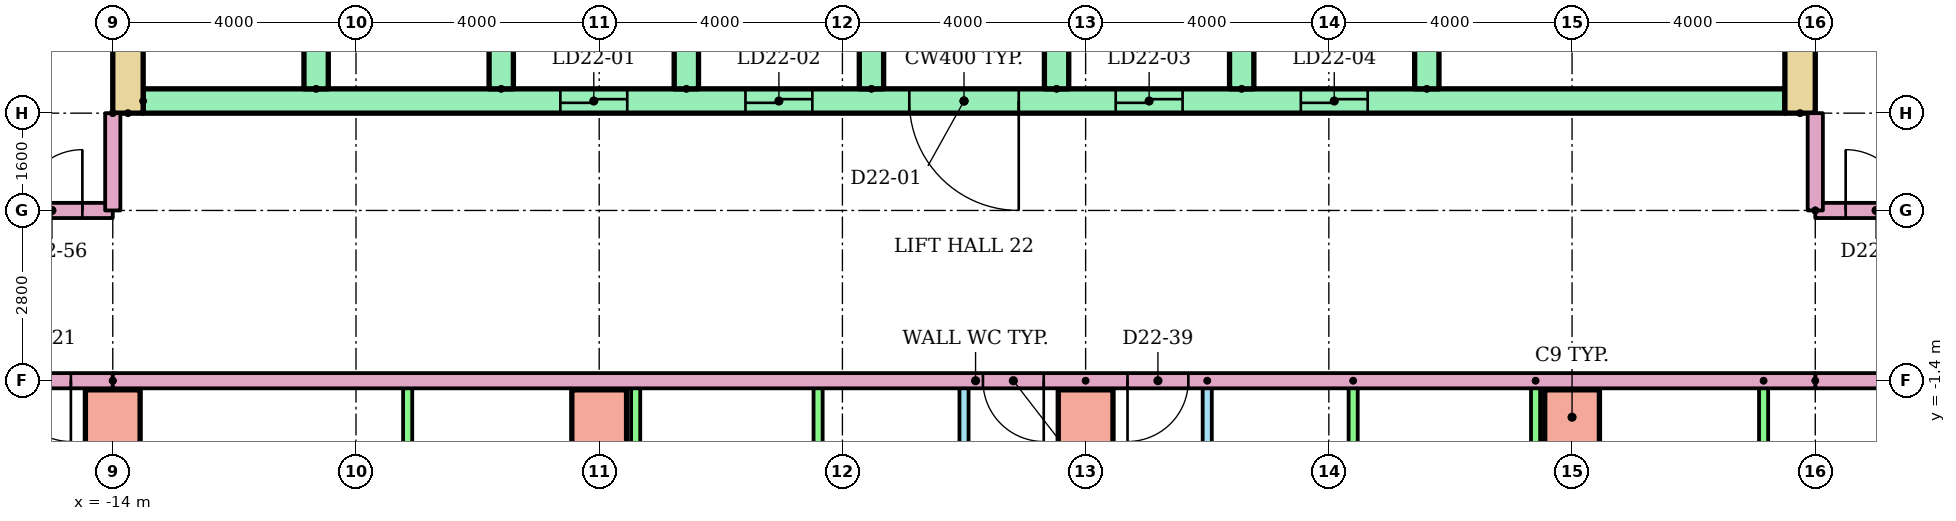
"""IFC4 building model, lengths in metres.
Left out: names, types, materials, properties, quantities, classifications, styles, units other than length and angle.
Written with IfcOpenShell. Run it as: python <this file> out.ifc"""

import sys

from ifc_helpers import new_model, si_unit, direction, frame, frame_2d, origin, origin_2d, place, context, subcontext, project, spatial, rectangle, extrude, element, fill, save


model = new_model("IFC4")
c1 = context("Model", 3, precision=1e-05, world=origin(), true_north=direction((0.0, 1.0)))
c2 = subcontext(c1, "Body", "Model", "MODEL_VIEW")
j1 = project(units=[si_unit("LENGTHUNIT", "METRE"), si_unit("PLANEANGLEUNIT", "RADIAN")], contexts=[c1])
p1 = place(None, origin())
s1 = spatial("IfcSite", under=j1, at=p1, CompositionType="ELEMENT")
p2 = place(p1, origin())
s2 = spatial("IfcBuilding", under=s1, at=p2, CompositionType="ELEMENT")
p3 = place(p2, frame((0.0, 0.0, 87.1)))
s3 = spatial("IfcBuildingStorey", under=s2, at=p3, CompositionType="ELEMENT", Elevation=87.1)
for number, where in (
    (1, (-14.0, -2.0, 0.0)),
    (2, (-6.0, -2.0, 0.0)),
    (3, (2.0, -2.0, 0.0)),
    (4, (10.0, -2.0, 0.0)),
):
    element("IfcColumn", number, at=place(p3, frame(where)), inside=s3, PredefinedType="COLUMN", context=c2, shape_type="SweptSolid", body=[
        extrude(rectangle(XDim=0.9, YDim=0.9, at=origin_2d()), origin(), (0.0, 0.0, 1.0), 3.2),
    ])
for number, where, z_axis, x_axis in (
    (5, (-13.75, 3.0, 0.0), (0.0, 0.0, 1.0), (0.0, 1.0, 0.0)),
    (6, (13.75, 3.0, 0.0), (0.0, 0.0, 1.0), (0.0, 1.0, 0.0)),
):
    element("IfcWall", number, at=place(p3, frame(where, z_axis=z_axis, x_axis=x_axis)), inside=s3, PredefinedType="SHEAR", context=c2, shape_type="SweptSolid", body=[
        extrude(rectangle(XDim=17.0, YDim=0.5, at=frame_2d((8.5, 0.0))), origin(), (0.0, 0.0, 1.0), 2.92),
    ])
p4 = place(p3, frame((-13.5, 3.2, 0.0)))
e7 = element("IfcWall", 7, at=p4, inside=s3, PredefinedType="SHEAR", context=c2, shape_type="SweptSolid", body=[
    extrude(rectangle(XDim=27.0, YDim=0.4, at=frame_2d((13.5, 0.0))), origin(), (0.0, 0.0, 1.0), 2.92),
])
p5 = place(p4, frame((6.861, 0.0, 0.0)))
e8 = element("IfcOpeningElement", 8, at=p5, cuts=e7, PredefinedType="OPENING", context=c2, shape_type="SweptSolid", body=[
    extrude(rectangle(XDim=1.1, YDim=2.1, at=frame_2d((0.55, 1.05))), frame((0.0, 0.21, 0.0), z_axis=(0.0, -1.0, 0.0), x_axis=(1.0, 0.0, 0.0)), (0.0, 0.0, 1.0), 0.42),
])
p6 = place(p4, frame((9.906, 0.0, 0.0)))
e9 = element("IfcOpeningElement", 9, at=p6, cuts=e7, PredefinedType="OPENING", context=c2, shape_type="SweptSolid", body=[
    extrude(rectangle(XDim=1.1, YDim=2.1, at=frame_2d((0.55, 1.05))), frame((0.0, 0.21, 0.0), z_axis=(0.0, -1.0, 0.0), x_axis=(1.0, 0.0, 0.0)), (0.0, 0.0, 1.0), 0.42),
])
p7 = place(p4, frame((15.994, 0.0, 0.0)))
e10 = element("IfcOpeningElement", 10, at=p7, cuts=e7, PredefinedType="OPENING", context=c2, shape_type="SweptSolid", body=[
    extrude(rectangle(XDim=1.1, YDim=2.1, at=frame_2d((0.55, 1.05))), frame((0.0, 0.21, 0.0), z_axis=(0.0, -1.0, 0.0), x_axis=(1.0, 0.0, 0.0)), (0.0, 0.0, 1.0), 0.42),
])
p8 = place(p4, frame((19.039, 0.0, 0.0)))
e11 = element("IfcOpeningElement", 11, at=p8, cuts=e7, PredefinedType="OPENING", context=c2, shape_type="SweptSolid", body=[
    extrude(rectangle(XDim=1.1, YDim=2.1, at=frame_2d((0.55, 1.05))), frame((0.0, 0.21, 0.0), z_axis=(0.0, -1.0, 0.0), x_axis=(1.0, 0.0, 0.0)), (0.0, 0.0, 1.0), 0.42),
])
p9 = place(p4, frame((12.6, 0.0, 0.0)))
e12 = element("IfcOpeningElement", 12, at=p9, cuts=e7, PredefinedType="OPENING", context=c2, shape_type="SweptSolid", body=[
    extrude(rectangle(XDim=1.8, YDim=2.1, at=frame_2d((0.9, 1.05))), frame((0.0, 0.21, 0.0), z_axis=(0.0, -1.0, 0.0), x_axis=(1.0, 0.0, 0.0)), (0.0, 0.0, 1.0), 0.42),
])
for number, where, z_axis, x_axis in (
    (13, (-10.656, 3.4, 0.0), (0.0, 0.0, 1.0), (0.0, 1.0, 0.0)),
    (14, (-7.611, 3.4, 0.0), (0.0, 0.0, 1.0), (0.0, 1.0, 0.0)),
    (15, (-4.567, 3.4, 0.0), (0.0, 0.0, 1.0), (0.0, 1.0, 0.0)),
    (16, (-1.522, 3.4, 0.0), (0.0, 0.0, 1.0), (0.0, 1.0, 0.0)),
    (17, (1.522, 3.4, 0.0), (0.0, 0.0, 1.0), (0.0, 1.0, 0.0)),
    (18, (4.567, 3.4, 0.0), (0.0, 0.0, 1.0), (0.0, 1.0, 0.0)),
    (19, (7.611, 3.4, 0.0), (0.0, 0.0, 1.0), (0.0, 1.0, 0.0)),
):
    element("IfcWall", number, at=place(p3, frame(where, z_axis=z_axis, x_axis=x_axis)), inside=s3, PredefinedType="SHEAR", context=c2, shape_type="SweptSolid", body=[
        extrude(rectangle(XDim=3.0, YDim=0.4, at=frame_2d((1.5, 0.0))), origin(), (0.0, 0.0, 1.0), 2.92),
    ])
p10 = place(p3, frame((0.0, -9.1, 0.0), z_axis=(0.0, 0.0, 1.0), x_axis=(0.0, 1.0, 0.0)))
e20 = element("IfcWall", 20, at=p10, inside=s3, PredefinedType="PARTITIONING", context=c2, shape_type="SweptSolid", body=[
    extrude(rectangle(XDim=7.7, YDim=0.15, at=frame_2d((3.85, 0.0))), origin(), (0.0, 0.0, 1.0), 2.4),
])
p11 = place(p10, frame((5.125, 0.0, 0.0)))
e21 = element("IfcOpeningElement", 21, at=p11, cuts=e20, PredefinedType="OPENING", context=c2, shape_type="SweptSolid", body=[
    extrude(rectangle(XDim=0.9, YDim=2.1, at=frame_2d((0.45, 1.05))), frame((0.0, 0.085, 0.0), z_axis=(0.0, -1.0, 0.0), x_axis=(1.0, 0.0, 0.0)), (0.0, 0.0, 1.0), 0.17),
])
p12 = place(p10, frame((1.325, 0.0, 0.0)))
e22 = element("IfcOpeningElement", 22, at=p12, cuts=e20, PredefinedType="OPENING", context=c2, shape_type="SweptSolid", body=[
    extrude(rectangle(XDim=0.8, YDim=2.1, at=frame_2d((0.4, 1.05))), frame((0.0, 0.085, 0.0), z_axis=(0.0, -1.0, 0.0), x_axis=(1.0, 0.0, 0.0)), (0.0, 0.0, 1.0), 0.17),
])
for number, where, z_axis, x_axis in (
    (23, (-2.4, -9.1, 0.0), (0.0, 0.0, 1.0), (0.0, 1.0, 0.0)),
    (24, (-5.4, -9.1, 0.0), (0.0, 0.0, 1.0), (0.0, 1.0, 0.0)),
    (25, (-9.15, -9.1, 0.0), (0.0, 0.0, 1.0), (0.0, 1.0, 0.0)),
):
    element("IfcWall", number, at=place(p3, frame(where, z_axis=z_axis, x_axis=x_axis)), inside=s3, PredefinedType="PARTITIONING", context=c2, shape_type="SweptSolid", body=[
        extrude(rectangle(XDim=7.7, YDim=0.15, at=frame_2d((3.85, 0.0))), origin(), (0.0, 0.0, 1.0), 2.4),
    ])
p13 = place(p3, frame((-14.0, -1.4, 0.0), z_axis=(0.0, 0.0, 1.0), x_axis=(0.0, -1.0, 0.0)))
e26 = element("IfcWall", 26, at=p13, inside=s3, PredefinedType="PARTITIONING", context=c2, shape_type="SweptSolid", body=[
    extrude(rectangle(XDim=14.81, YDim=0.25, at=frame_2d((7.405, 0.0))), origin(), (0.0, 0.0, 1.0), 2.4),
])
p14 = place(p3, frame((4.0, -1.4, 0.0), z_axis=(0.0, 0.0, 1.0), x_axis=(0.0, -1.0, 0.0)))
e27 = element("IfcWall", 27, at=p14, inside=s3, PredefinedType="PARTITIONING", context=c2, shape_type="SweptSolid", body=[
    extrude(rectangle(XDim=7.7, YDim=0.15, at=frame_2d((3.85, 0.0))), origin(), (0.0, 0.0, 1.0), 2.4),
])
p15 = place(p14, frame((1.675, 0.0, 0.0)))
e28 = element("IfcOpeningElement", 28, at=p15, cuts=e27, PredefinedType="OPENING", context=c2, shape_type="SweptSolid", body=[
    extrude(rectangle(XDim=0.9, YDim=2.1, at=frame_2d((0.45, 1.05))), frame((0.0, 0.085, 0.0), z_axis=(0.0, -1.0, 0.0), x_axis=(1.0, 0.0, 0.0)), (0.0, 0.0, 1.0), 0.17),
])
p16 = place(p14, frame((5.575, 0.0, 0.0)))
e29 = element("IfcOpeningElement", 29, at=p16, cuts=e27, PredefinedType="OPENING", context=c2, shape_type="SweptSolid", body=[
    extrude(rectangle(XDim=0.8, YDim=2.1, at=frame_2d((0.4, 1.05))), frame((0.0, 0.085, 0.0), z_axis=(0.0, -1.0, 0.0), x_axis=(1.0, 0.0, 0.0)), (0.0, 0.0, 1.0), 0.17),
])
for number, where, z_axis, x_axis in (
    (30, (6.4, -1.4, 0.0), (0.0, 0.0, 1.0), (0.0, -1.0, 0.0)),
    (31, (9.4, -1.4, 0.0), (0.0, 0.0, 1.0), (0.0, -1.0, 0.0)),
    (32, (13.15, -1.4, 0.0), (0.0, 0.0, 1.0), (0.0, -1.0, 0.0)),
):
    element("IfcWall", number, at=place(p3, frame(where, z_axis=z_axis, x_axis=x_axis)), inside=s3, PredefinedType="PARTITIONING", context=c2, shape_type="SweptSolid", body=[
        extrude(rectangle(XDim=7.7, YDim=0.15, at=frame_2d((3.85, 0.0))), origin(), (0.0, 0.0, 1.0), 2.4),
    ])
p17 = place(p3, frame((2.0, -1.4, 0.0), z_axis=(0.0, 0.0, 1.0), x_axis=(0.0, -1.0, 0.0)))
e33 = element("IfcWall", 33, at=p17, inside=s3, PredefinedType="PARTITIONING", context=c2, shape_type="SweptSolid", body=[
    extrude(rectangle(XDim=14.81, YDim=0.25, at=frame_2d((7.405, 0.0))), origin(), (0.0, 0.0, 1.0), 2.4),
])
p18 = place(p3, frame((-14.0, -1.4, 0.0), z_axis=(0.0, 0.0, 1.0), x_axis=(-1.0, 0.0, 0.0)))
e34 = element("IfcWall", 34, at=p18, inside=s3, PredefinedType="PARTITIONING", context=c2, shape_type="SweptSolid", body=[
    extrude(rectangle(XDim=14.62, YDim=0.25, at=frame_2d((7.31, 0.0))), origin(), (0.0, 0.0, 1.0), 2.4),
])
p19 = place(p18, frame((0.689, 0.0, 0.0)))
e35 = element("IfcOpeningElement", 35, at=p19, cuts=e34, PredefinedType="OPENING", context=c2, shape_type="SweptSolid", body=[
    extrude(rectangle(XDim=1.0, YDim=2.1, at=frame_2d((0.5, 1.05))), frame((0.0, 0.135, 0.0), z_axis=(0.0, -1.0, 0.0), x_axis=(1.0, 0.0, 0.0)), (0.0, 0.0, 1.0), 0.27),
])
p20 = place(p3, frame((29.0, -1.4, 0.0), z_axis=(0.0, 0.0, 1.0), x_axis=(-1.0, 0.0, 0.0)))
e36 = element("IfcWall", 36, at=p20, inside=s3, PredefinedType="PARTITIONING", context=c2, shape_type="SweptSolid", body=[
    extrude(rectangle(XDim=15.0, YDim=0.25, at=frame_2d((7.5, 0.0))), origin(), (0.0, 0.0, 1.0), 2.4),
])
p21 = place(p20, frame((9.311, 0.0, 0.0)))
e37 = element("IfcOpeningElement", 37, at=p21, cuts=e36, PredefinedType="OPENING", context=c2, shape_type="SweptSolid", body=[
    extrude(rectangle(XDim=1.0, YDim=2.1, at=frame_2d((0.5, 1.05))), frame((0.0, 0.135, 0.0), z_axis=(0.0, -1.0, 0.0), x_axis=(1.0, 0.0, 0.0)), (0.0, 0.0, 1.0), 0.27),
])
p22 = place(p3, frame((-28.62, 1.4, 0.0)))
e38 = element("IfcWall", 38, at=p22, inside=s3, PredefinedType="PARTITIONING", context=c2, shape_type="SweptSolid", body=[
    extrude(rectangle(XDim=14.62, YDim=0.25, at=frame_2d((7.31, 0.0))), origin(), (0.0, 0.0, 1.0), 2.4),
])
p23 = place(p22, frame((13.12, 0.0, 0.0)))
e39 = element("IfcOpeningElement", 39, at=p23, cuts=e38, PredefinedType="OPENING", context=c2, shape_type="SweptSolid", body=[
    extrude(rectangle(XDim=1.0, YDim=2.1, at=frame_2d((0.5, 1.05))), frame((0.0, 0.135, 0.0), z_axis=(0.0, -1.0, 0.0), x_axis=(1.0, 0.0, 0.0)), (0.0, 0.0, 1.0), 0.27),
])
p24 = place(p3, frame((14.0, 1.4, 0.0)))
e40 = element("IfcWall", 40, at=p24, inside=s3, PredefinedType="PARTITIONING", context=c2, shape_type="SweptSolid", body=[
    extrude(rectangle(XDim=15.0, YDim=0.25, at=frame_2d((7.5, 0.0))), origin(), (0.0, 0.0, 1.0), 2.4),
])
p25 = place(p24, frame((0.5, 0.0, 0.0)))
e41 = element("IfcOpeningElement", 41, at=p25, cuts=e40, PredefinedType="OPENING", context=c2, shape_type="SweptSolid", body=[
    extrude(rectangle(XDim=1.0, YDim=2.1, at=frame_2d((0.5, 1.05))), frame((0.0, 0.135, 0.0), z_axis=(0.0, -1.0, 0.0), x_axis=(1.0, 0.0, 0.0)), (0.0, 0.0, 1.0), 0.27),
])
p26 = place(p24, frame((12.689, 0.0, 0.0)))
e42 = element("IfcOpeningElement", 42, at=p26, cuts=e40, PredefinedType="OPENING", context=c2, shape_type="SweptSolid", body=[
    extrude(rectangle(XDim=1.0, YDim=2.1, at=frame_2d((0.5, 1.05))), frame((0.0, 0.135, 0.0), z_axis=(0.0, -1.0, 0.0), x_axis=(1.0, 0.0, 0.0)), (0.0, 0.0, 1.0), 0.27),
])
p27 = place(p3, frame((14.0, -1.4, 0.0), z_axis=(0.0, 0.0, 1.0), x_axis=(-1.0, 0.0, 0.0)))
e43 = element("IfcWall", 43, at=p27, inside=s3, PredefinedType="PARTITIONING", context=c2, shape_type="SweptSolid", body=[
    extrude(rectangle(XDim=28.0, YDim=0.25, at=frame_2d((14.0, 0.0))), origin(), (0.0, 0.0, 1.0), 2.4),
])
p28 = place(p27, frame((12.689, 0.0, 0.0)))
e44 = element("IfcOpeningElement", 44, at=p28, cuts=e43, PredefinedType="OPENING", context=c2, shape_type="SweptSolid", body=[
    extrude(rectangle(XDim=1.0, YDim=2.1, at=frame_2d((0.5, 1.05))), frame((0.0, 0.135, 0.0), z_axis=(0.0, -1.0, 0.0), x_axis=(1.0, 0.0, 0.0)), (0.0, 0.0, 1.0), 0.27),
])
p29 = place(p27, frame((10.311, 0.0, 0.0)))
e45 = element("IfcOpeningElement", 45, at=p29, cuts=e43, PredefinedType="OPENING", context=c2, shape_type="SweptSolid", body=[
    extrude(rectangle(XDim=1.0, YDim=2.1, at=frame_2d((0.5, 1.05))), frame((0.0, 0.135, 0.0), z_axis=(0.0, -1.0, 0.0), x_axis=(1.0, 0.0, 0.0)), (0.0, 0.0, 1.0), 0.27),
])
for number, where, z_axis, x_axis in (
    (46, (-14.0, 3.0, 0.0), (0.0, 0.0, 1.0), (0.0, -1.0, 0.0)),
    (47, (14.0, 1.4, 0.0), (0.0, 0.0, 1.0), (0.0, 1.0, 0.0)),
):
    element("IfcWall", number, at=place(p3, frame(where, z_axis=z_axis, x_axis=x_axis)), inside=s3, PredefinedType="PARTITIONING", context=c2, shape_type="SweptSolid", body=[
        extrude(rectangle(XDim=1.6, YDim=0.25, at=frame_2d((0.8, 0.0))), origin(), (0.0, 0.0, 1.0), 2.4),
    ])
p30 = place(p5, origin())
e48 = element("IfcDoor", 48, at=p30, inside=s3, OperationType="SLIDING_TO_LEFT", PredefinedType="DOOR", context=c2, shape_type="SweptSolid", body=[
    extrude(rectangle(XDim=1.1, YDim=2.1, at=frame_2d((0.55, 1.05))), frame((0.0, 0.025, 0.0), z_axis=(0.0, -1.0, 0.0), x_axis=(1.0, 0.0, 0.0)), (0.0, 0.0, 1.0), 0.05),
])
fill(e8, e48)
p31 = place(p6, origin())
e49 = element("IfcDoor", 49, at=p31, inside=s3, OperationType="SLIDING_TO_LEFT", PredefinedType="DOOR", context=c2, shape_type="SweptSolid", body=[
    extrude(rectangle(XDim=1.1, YDim=2.1, at=frame_2d((0.55, 1.05))), frame((0.0, 0.025, 0.0), z_axis=(0.0, -1.0, 0.0), x_axis=(1.0, 0.0, 0.0)), (0.0, 0.0, 1.0), 0.05),
])
fill(e9, e49)
p32 = place(p7, origin())
e50 = element("IfcDoor", 50, at=p32, inside=s3, OperationType="SLIDING_TO_LEFT", PredefinedType="DOOR", context=c2, shape_type="SweptSolid", body=[
    extrude(rectangle(XDim=1.1, YDim=2.1, at=frame_2d((0.55, 1.05))), frame((0.0, 0.025, 0.0), z_axis=(0.0, -1.0, 0.0), x_axis=(1.0, 0.0, 0.0)), (0.0, 0.0, 1.0), 0.05),
])
fill(e10, e50)
p33 = place(p8, origin())
e51 = element("IfcDoor", 51, at=p33, inside=s3, OperationType="SLIDING_TO_LEFT", PredefinedType="DOOR", context=c2, shape_type="SweptSolid", body=[
    extrude(rectangle(XDim=1.1, YDim=2.1, at=frame_2d((0.55, 1.05))), frame((0.0, 0.025, 0.0), z_axis=(0.0, -1.0, 0.0), x_axis=(1.0, 0.0, 0.0)), (0.0, 0.0, 1.0), 0.05),
])
fill(e11, e51)
p34 = place(p9, frame((1.8, 0.0, 0.0), z_axis=(0.0, 0.0, 1.0), x_axis=(-1.0, 0.0, 0.0)))
e52 = element("IfcDoor", 52, at=p34, inside=s3, OperationType="DOUBLE_DOOR_SINGLE_SWING", PredefinedType="DOOR", context=c2, shape_type="SweptSolid", body=[
    extrude(rectangle(XDim=1.8, YDim=2.1, at=frame_2d((0.9, 1.05))), frame((0.0, 0.025, 0.0), z_axis=(0.0, -1.0, 0.0), x_axis=(1.0, 0.0, 0.0)), (0.0, 0.0, 1.0), 0.05),
])
fill(e12, e52)
p35 = place(p19, origin())
e53 = element("IfcDoor", 53, at=p35, inside=s3, OperationType="SINGLE_SWING_LEFT", PredefinedType="DOOR", context=c2, shape_type="SweptSolid", body=[
    extrude(rectangle(XDim=1.0, YDim=2.1, at=frame_2d((0.5, 1.05))), frame((0.0, 0.025, 0.0), z_axis=(0.0, -1.0, 0.0), x_axis=(1.0, 0.0, 0.0)), (0.0, 0.0, 1.0), 0.05),
])
fill(e35, e53)
p36 = place(p28, origin())
e54 = element("IfcDoor", 54, at=p36, inside=s3, OperationType="SINGLE_SWING_LEFT", PredefinedType="DOOR", context=c2, shape_type="SweptSolid", body=[
    extrude(rectangle(XDim=1.0, YDim=2.1, at=frame_2d((0.5, 1.05))), frame((0.0, 0.025, 0.0), z_axis=(0.0, -1.0, 0.0), x_axis=(1.0, 0.0, 0.0)), (0.0, 0.0, 1.0), 0.05),
])
fill(e44, e54)
p37 = place(p29, origin())
e55 = element("IfcDoor", 55, at=p37, inside=s3, OperationType="SINGLE_SWING_RIGHT", PredefinedType="DOOR", context=c2, shape_type="SweptSolid", body=[
    extrude(rectangle(XDim=1.0, YDim=2.1, at=frame_2d((0.5, 1.05))), frame((0.0, 0.025, 0.0), z_axis=(0.0, -1.0, 0.0), x_axis=(1.0, 0.0, 0.0)), (0.0, 0.0, 1.0), 0.05),
])
fill(e45, e55)
p38 = place(p23, origin())
e56 = element("IfcDoor", 56, at=p38, inside=s3, OperationType="SINGLE_SWING_RIGHT", PredefinedType="DOOR", context=c2, shape_type="SweptSolid", body=[
    extrude(rectangle(XDim=1.0, YDim=2.1, at=frame_2d((0.5, 1.05))), frame((0.0, 0.025, 0.0), z_axis=(0.0, -1.0, 0.0), x_axis=(1.0, 0.0, 0.0)), (0.0, 0.0, 1.0), 0.05),
])
fill(e39, e56)
p39 = place(p25, origin())
e57 = element("IfcDoor", 57, at=p39, inside=s3, OperationType="SINGLE_SWING_LEFT", PredefinedType="DOOR", context=c2, shape_type="SweptSolid", body=[
    extrude(rectangle(XDim=1.0, YDim=2.1, at=frame_2d((0.5, 1.05))), frame((0.0, 0.025, 0.0), z_axis=(0.0, -1.0, 0.0), x_axis=(1.0, 0.0, 0.0)), (0.0, 0.0, 1.0), 0.05),
])
fill(e41, e57)
save(model, sys.argv[1])
